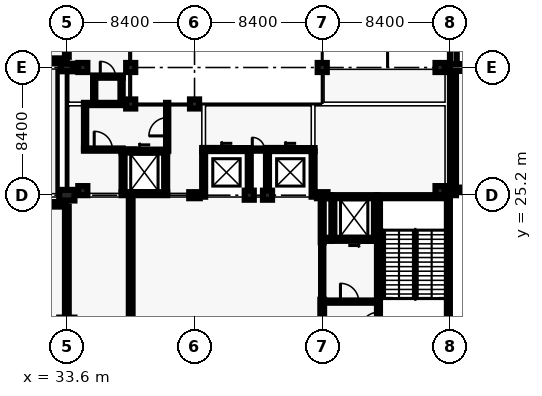
"""IFC4 building model, lengths in metres.
Left out: names, types, materials, properties, quantities, classifications, styles, units other than length and angle.
Written with IfcOpenShell. Run it as: python <this file> out.ifc"""

import sys

from ifc_helpers import new_model, si_unit, direction, frame, frame_2d, origin, origin_2d, place, context, subcontext, project, spatial, rectangle, extrude, element, fill, save


model = new_model("IFC4")
c1 = context("Model", 3, precision=1e-05, world=origin(), true_north=direction((0.0, 1.0)))
c2 = subcontext(c1, "Body", "Model", "MODEL_VIEW")
j1 = project(units=[si_unit("LENGTHUNIT", "METRE"), si_unit("PLANEANGLEUNIT", "RADIAN")], contexts=[c1])
p1 = place(None, origin())
s1 = spatial("IfcSite", under=j1, at=p1, CompositionType="ELEMENT")
p2 = place(p1, origin())
s2 = spatial("IfcBuilding", under=s1, at=p2, CompositionType="ELEMENT")
p3 = place(p2, frame((0.0, 0.0, 10.2)))
s3 = spatial("IfcBuildingStorey", under=s2, at=p3, CompositionType="ELEMENT", Elevation=10.2)
p4 = place(p3, frame((54.0, 25.1, 0.0), z_axis=(0.0, 0.0, 1.0), x_axis=(1.0, 0.0, 0.0)))
e1 = element("IfcWall", 1, at=p4, inside=s3, PredefinedType="SHEAR", context=c2, shape_type="SweptSolid", body=[
    extrude(rectangle(XDim=4.8, YDim=0.2, at=frame_2d((2.4, 0.0))), origin(), (0.0, 0.0, 1.0), 4.8),
])
p5 = place(p3, frame((54.1, 15.8, 0.0), z_axis=(0.0, 0.0, 1.0), x_axis=(0.0, 1.0, 0.0)))
e2 = element("IfcWall", 2, at=p5, inside=s3, PredefinedType="SHEAR", context=c2, shape_type="SweptSolid", body=[
    extrude(rectangle(XDim=9.2, YDim=0.2, at=frame_2d((4.6, 0.0))), origin(), (0.0, 0.0, 1.0), 4.8),
])
p6 = place(p5, frame((0.5, 0.0, 0.0)))
e3 = element("IfcOpeningElement", 3, at=p6, cuts=e2, PredefinedType="OPENING", context=c2, shape_type="SweptSolid", body=[
    extrude(rectangle(XDim=1.2, YDim=2.1, at=frame_2d((0.6, 1.05))), frame((0.0, 0.11, 0.0), z_axis=(0.0, -1.0, 0.0), x_axis=(1.0, 0.0, 0.0)), (0.0, 0.0, 1.0), 0.22),
])
p7 = place(p3, frame((58.7, 25.0, 0.0), z_axis=(0.0, 0.0, 1.0), x_axis=(0.0, -1.0, 0.0)))
e4 = element("IfcWall", 4, at=p7, inside=s3, PredefinedType="SHEAR", context=c2, shape_type="SweptSolid", body=[
    extrude(rectangle(XDim=9.2, YDim=0.2, at=frame_2d((4.6, 0.0))), origin(), (0.0, 0.0, 1.0), 4.8),
])
p8 = place(p3, frame((54.0, 22.3, 0.0), z_axis=(0.0, 0.0, 1.0), x_axis=(-1.0, 0.0, 0.0)))
e5 = element("IfcWall", 5, at=p8, inside=s3, PredefinedType="SHEAR", context=c2, shape_type="SweptSolid", body=[
    extrude(rectangle(XDim=3.0, YDim=0.2, at=frame_2d((1.5, 0.0))), origin(), (0.0, 0.0, 1.0), 4.8),
])
p9 = place(p8, frame((0.95, 0.0, 0.0)))
e6 = element("IfcOpeningElement", 6, at=p9, cuts=e5, PredefinedType="OPENING", context=c2, shape_type="SweptSolid", body=[
    extrude(rectangle(XDim=1.1, YDim=2.1, at=frame_2d((0.55, 1.05))), frame((0.0, 0.11, 0.0), z_axis=(0.0, -1.0, 0.0), x_axis=(1.0, 0.0, 0.0)), (0.0, 0.0, 1.0), 0.22),
])
p10 = place(p3, frame((51.0, 25.1, 0.0), z_axis=(0.0, 0.0, 1.0), x_axis=(1.0, 0.0, 0.0)))
e7 = element("IfcWall", 7, at=p10, inside=s3, PredefinedType="SHEAR", context=c2, shape_type="SweptSolid", body=[
    extrude(rectangle(XDim=3.0, YDim=0.2, at=frame_2d((1.5, 0.0))), origin(), (0.0, 0.0, 1.0), 4.8),
])
for number, where, z_axis, x_axis in (
    (8, (51.1, 22.4, 0.0), (0.0, 0.0, 1.0), (0.0, 1.0, 0.0)),
    (9, (53.9, 25.0, 0.0), (0.0, 0.0, 1.0), (0.0, -1.0, 0.0)),
):
    element("IfcWall", number, at=place(p3, frame(where, z_axis=z_axis, x_axis=x_axis)), inside=s3, PredefinedType="SHEAR", context=c2, shape_type="SweptSolid", body=[
        extrude(rectangle(XDim=2.6, YDim=0.2, at=frame_2d((1.3, 0.0))), origin(), (0.0, 0.0, 1.0), 4.8),
    ])
p11 = place(p3, frame((40.2, 25.3, 0.0), z_axis=(0.0, 0.0, 1.0), x_axis=(-1.0, 0.0, 0.0)))
e10 = element("IfcWall", 10, at=p11, inside=s3, PredefinedType="SHEAR", context=c2, shape_type="SweptSolid", body=[
    extrude(rectangle(XDim=3.0, YDim=0.2, at=frame_2d((1.5, 0.0))), origin(), (0.0, 0.0, 1.0), 4.8),
])
p12 = place(p3, frame((37.2, 28.1, 0.0), z_axis=(0.0, 0.0, 1.0), x_axis=(1.0, 0.0, 0.0)))
e11 = element("IfcWall", 11, at=p12, inside=s3, PredefinedType="SHEAR", context=c2, shape_type="SweptSolid", body=[
    extrude(rectangle(XDim=3.0, YDim=0.2, at=frame_2d((1.5, 0.0))), origin(), (0.0, 0.0, 1.0), 4.8),
])
p13 = place(p12, frame((0.95, 0.0, 0.0)))
e12 = element("IfcOpeningElement", 12, at=p13, cuts=e11, PredefinedType="OPENING", context=c2, shape_type="SweptSolid", body=[
    extrude(rectangle(XDim=1.1, YDim=2.1, at=frame_2d((0.55, 1.05))), frame((0.0, 0.11, 0.0), z_axis=(0.0, -1.0, 0.0), x_axis=(1.0, 0.0, 0.0)), (0.0, 0.0, 1.0), 0.22),
])
for number, where, z_axis, x_axis in (
    (13, (37.3, 25.4, 0.0), (0.0, 0.0, 1.0), (0.0, 1.0, 0.0)),
    (14, (40.1, 28.0, 0.0), (0.0, 0.0, 1.0), (0.0, -1.0, 0.0)),
):
    element("IfcWall", number, at=place(p3, frame(where, z_axis=z_axis, x_axis=x_axis)), inside=s3, PredefinedType="SHEAR", context=c2, shape_type="SweptSolid", body=[
        extrude(rectangle(XDim=2.6, YDim=0.2, at=frame_2d((1.3, 0.0))), origin(), (0.0, 0.0, 1.0), 4.8),
    ])
p14 = place(p3, frame((62.4, 33.6, 0.0), z_axis=(0.0, 0.0, 1.0), x_axis=(-1.0, 0.0, 0.0)))
e15 = element("IfcWall", 15, at=p14, inside=s3, PredefinedType="SHEAR", context=c2, shape_type="SweptSolid", body=[
    extrude(rectangle(XDim=3.6, YDim=0.45, at=frame_2d((1.8, 0.0))), origin(), (0.0, 0.0, 1.0), 4.8),
])
p15 = place(p3, frame((59.025, 33.825, 0.0), z_axis=(0.0, 0.0, 1.0), x_axis=(0.0, 1.0, 0.0)))
e16 = element("IfcWall", 16, at=p15, inside=s3, PredefinedType="SHEAR", context=c2, shape_type="SweptSolid", body=[
    extrude(rectangle(XDim=23.775, YDim=0.45, at=frame_2d((11.888, 0.0))), origin(), (0.0, 0.0, 1.0), 4.8),
])
p16 = place(p3, frame((59.0, 25.2, 0.0), z_axis=(0.0, 0.0, 1.0), x_axis=(0.0, 1.0, 0.0)))
e17 = element("IfcWall", 17, at=p16, inside=s3, PredefinedType="SHEAR", context=c2, shape_type="SweptSolid", body=[
    extrude(rectangle(XDim=8.175, YDim=0.4, at=frame_2d((4.087, 0.0))), origin(), (0.0, 0.0, 1.0), 4.8),
])
for number, where, z_axis, x_axis in (
    (18, (33.6, 16.8, 0.0), (0.0, 0.0, 1.0), (0.0, 1.0, 0.0)),
    (19, (33.6, 25.2, 0.0), (0.0, 0.0, 1.0), (1.0, 0.0, 0.0)),
):
    element("IfcColumn", number, at=place(p3, frame(where, z_axis=z_axis, x_axis=x_axis)), inside=s3, PredefinedType="COLUMN", context=c2, shape_type="SweptSolid", body=[
        extrude(rectangle(XDim=1.0, YDim=0.7, at=origin_2d()), origin(), (0.0, 0.0, 1.0), 4.8),
    ])
for number, where, z_axis, x_axis in (
    (20, (42.0, 25.2, 0.0), (0.0, 0.0, 1.0), (1.0, 0.0, 0.0)),
    (21, (50.4, 25.2, 0.0), (0.0, 0.0, 1.0), (1.0, 0.0, 0.0)),
):
    element("IfcColumn", number, at=place(p3, frame(where, z_axis=z_axis, x_axis=x_axis)), inside=s3, PredefinedType="COLUMN", context=c2, shape_type="SweptSolid", body=[
        extrude(rectangle(XDim=0.7, YDim=0.4, at=origin_2d()), origin(), (0.0, 0.0, 1.0), 4.8),
    ])
p17 = place(p3, frame((33.6, 33.6, 0.0), z_axis=(0.0, 0.0, 1.0), x_axis=(1.0, 0.0, 0.0)))
e22 = element("IfcColumn", 22, at=p17, inside=s3, PredefinedType="COLUMN", context=c2, shape_type="SweptSolid", body=[
    extrude(rectangle(XDim=0.8, YDim=0.5, at=origin_2d()), origin(), (0.0, 0.0, 1.0), 4.8),
])
for number, where, z_axis, x_axis in (
    (23, (50.4, 33.6, 0.0), (0.0, 0.0, 1.0), (1.0, 0.0, 0.0)),
    (24, (34.65, 25.5, 0.0), (0.0, 0.0, 1.0), (1.0, 0.0, 0.0)),
    (25, (34.65, 33.6, 0.0), (0.0, 0.0, 1.0), (1.0, 0.0, 0.0)),
    (26, (58.15, 25.5, 0.0), (0.0, 0.0, 1.0), (1.0, 0.0, 0.0)),
    (27, (58.15, 33.6, 0.0), (0.0, 0.0, 1.0), (1.0, 0.0, 0.0)),
):
    element("IfcColumn", number, at=place(p3, frame(where, z_axis=z_axis, x_axis=x_axis)), inside=s3, PredefinedType="COLUMN", context=c2, shape_type="SweptSolid", body=[
        extrude(rectangle(XDim=0.6, YDim=0.6, at=origin_2d()), origin(), (0.0, 0.0, 1.0), 4.8),
    ])
p18 = place(p3, frame((51.0, 22.3, 0.0), z_axis=(0.0, 0.0, 1.0), x_axis=(-1.0, 0.0, 0.0)))
e28 = element("IfcWall", 28, at=p18, inside=s3, PredefinedType="SHEAR", context=c2, shape_type="SweptSolid", body=[
    extrude(rectangle(XDim=0.5, YDim=0.2, at=frame_2d((0.25, 0.0))), origin(), (0.0, 0.0, 1.0), 4.8),
])
p19 = place(p3, frame((50.75, 25.1, 0.0), z_axis=(0.0, 0.0, 1.0), x_axis=(1.0, 0.0, 0.0)))
e29 = element("IfcWall", 29, at=p19, inside=s3, PredefinedType="SHEAR", context=c2, shape_type="SweptSolid", body=[
    extrude(rectangle(XDim=0.25, YDim=0.2, at=frame_2d((0.125, 0.0))), origin(), (0.0, 0.0, 1.0), 4.8),
])
p20 = place(p3, frame((58.625, 33.375, 0.0), z_axis=(0.0, 0.0, 1.0), x_axis=(0.0, 1.0, 0.0)))
e30 = element("IfcWall", 30, at=p20, inside=s3, PredefinedType="SHEAR", context=c2, shape_type="SweptSolid", body=[
    extrude(rectangle(XDim=0.45, YDim=0.35, at=frame_2d((0.225, 0.0))), origin(), (0.0, 0.0, 1.0), 4.8),
])
for number, where, z_axis, x_axis in (
    (31, (45.599, 25.2, 0.0), (0.0, 0.0, 1.0), (1.0, 0.0, 0.0)),
    (32, (46.801, 25.2, 0.0), (0.0, 0.0, 1.0), (1.0, 0.0, 0.0)),
    (33, (37.8, 31.2, 0.0), (0.0, 0.0, 1.0), (1.0, 0.0, 0.0)),
    (34, (37.801, 33.6, 0.0), (0.0, 0.0, 1.0), (1.0, 0.0, 0.0)),
    (35, (42.0, 31.201, 0.0), (0.0, 0.0, 1.0), (1.0, 0.0, 0.0)),
):
    element("IfcColumn", number, at=place(p3, frame(where, z_axis=z_axis, x_axis=x_axis)), inside=s3, PredefinedType="COLUMN", context=c2, shape_type="SweptSolid", body=[
        extrude(rectangle(XDim=0.6, YDim=0.6, at=origin_2d()), origin(), (0.0, 0.0, 1.0), 4.8),
    ])
p21 = place(p3, frame((26.95, 24.6, 0.0), z_axis=(0.0, 0.0, 1.0), x_axis=(1.0, 0.0, 0.0)))
e36 = element("IfcWall", 36, at=p21, inside=s3, PredefinedType="SOLIDWALL", context=c2, shape_type="SweptSolid", body=[
    extrude(rectangle(XDim=6.525, YDim=0.3, at=frame_2d((3.262, 0.0))), origin(), (0.0, 0.0, 1.0), 4.5),
])
p22 = place(p21, frame((1.825, 0.0, 0.9)))
e37 = element("IfcOpeningElement", 37, at=p22, cuts=e36, PredefinedType="OPENING", context=c2, shape_type="SweptSolid", body=[
    extrude(rectangle(XDim=2.4, YDim=1.5, at=frame_2d((1.2, 0.75))), frame((0.0, 0.16, 0.0), z_axis=(0.0, -1.0, 0.0), x_axis=(1.0, 0.0, 0.0)), (0.0, 0.0, 1.0), 0.32),
])
p23 = place(p3, frame((62.4, 25.55, 0.0), z_axis=(0.0, 0.0, 1.0), x_axis=(-1.0, 0.0, 0.0)))
e38 = element("IfcWall", 38, at=p23, inside=s3, PredefinedType="SOLIDWALL", context=c2, shape_type="SweptSolid", body=[
    extrude(rectangle(XDim=3.2, YDim=0.3, at=frame_2d((1.6, 0.0))), origin(), (0.0, 0.0, 1.0), 4.8),
])
p24 = place(p23, frame((0.3, 0.0, 0.9)))
e39 = element("IfcOpeningElement", 39, at=p24, cuts=e38, PredefinedType="OPENING", context=c2, shape_type="SweptSolid", body=[
    extrude(rectangle(XDim=2.4, YDim=1.8, at=frame_2d((1.2, 0.9))), frame((0.0, 0.16, 0.0), z_axis=(0.0, -1.0, 0.0), x_axis=(1.0, 0.0, 0.0)), (0.0, 0.0, 1.0), 0.32),
])
p25 = place(p3, frame((33.6, 34.05, 0.0), z_axis=(0.0, 0.0, 1.0), x_axis=(-1.0, 0.0, 0.0)))
e40 = element("IfcWall", 40, at=p25, inside=s3, PredefinedType="SOLIDWALL", context=c2, shape_type="SweptSolid", body=[
    extrude(rectangle(XDim=4.2, YDim=0.3, at=frame_2d((2.1, 0.0))), origin(), (0.0, 0.0, 1.0), 4.5),
])
p26 = place(p3, frame((33.6, 8.6, 0.0), z_axis=(0.0, 0.0, 1.0), x_axis=(0.0, 1.0, 0.0)))
e41 = element("IfcWall", 41, at=p26, inside=s3, PredefinedType="SOLIDWALL", context=c2, shape_type="SweptSolid", body=[
    extrude(rectangle(XDim=15.85, YDim=0.25, at=frame_2d((7.925, 0.0))), origin(), (0.0, 0.0, 1.0), 3.8),
])
p27 = place(p3, frame((33.6, 34.3, 0.0), z_axis=(0.0, 0.0, 1.0), x_axis=(0.0, 1.0, 0.0)))
e42 = element("IfcWall", 42, at=p27, inside=s3, PredefinedType="SOLIDWALL", context=c2, shape_type="SweptSolid", body=[
    extrude(rectangle(XDim=7.825, YDim=0.25, at=frame_2d((3.913, 0.0))), origin(), (0.0, 0.0, 1.0), 3.8),
])
p28 = place(p27, frame((2.9, 0.0, 0.0)))
e43 = element("IfcOpeningElement", 43, at=p28, cuts=e42, PredefinedType="OPENING", context=c2, shape_type="SweptSolid", body=[
    extrude(rectangle(XDim=1.2, YDim=2.1, at=frame_2d((0.6, 1.05))), frame((0.0, 0.135, 0.0), z_axis=(0.0, -1.0, 0.0), x_axis=(1.0, 0.0, 0.0)), (0.0, 0.0, 1.0), 0.27),
])
p29 = place(p3, frame((37.8, 8.525, 0.0), z_axis=(0.0, 0.0, 1.0), x_axis=(0.0, 1.0, 0.0)))
e44 = element("IfcWall", 44, at=p29, inside=s3, PredefinedType="PARTITIONING", context=c2, shape_type="SweptSolid", body=[
    extrude(rectangle(XDim=16.675, YDim=0.25, at=frame_2d((8.337, 0.0))), origin(), (0.0, 0.0, 1.0), 3.8),
])
p30 = place(p3, frame((50.4, 8.525, 0.0), z_axis=(0.0, 0.0, 1.0), x_axis=(0.0, 1.0, 0.0)))
e45 = element("IfcWall", 45, at=p30, inside=s3, PredefinedType="PARTITIONING", context=c2, shape_type="SweptSolid", body=[
    extrude(rectangle(XDim=9.8, YDim=0.25, at=frame_2d((4.9, 0.0))), origin(), (0.0, 0.0, 1.0), 3.8),
])
p31 = place(p3, frame((42.5, 28.2, 0.0), z_axis=(0.0, 0.0, 1.0), x_axis=(1.0, 0.0, 0.0)))
e46 = element("IfcWall", 46, at=p31, inside=s3, PredefinedType="SHEAR", context=c2, shape_type="SweptSolid", body=[
    extrude(rectangle(XDim=3.2, YDim=0.2, at=frame_2d((1.6, 0.0))), origin(), (0.0, 0.0, 1.0), 4.5),
])
p32 = place(p31, frame((1.05, 0.0, 0.0)))
e47 = element("IfcOpeningElement", 47, at=p32, cuts=e46, PredefinedType="OPENING", context=c2, shape_type="SweptSolid", body=[
    extrude(rectangle(XDim=1.1, YDim=2.1, at=frame_2d((0.55, 1.05))), frame((0.0, 0.11, 0.0), z_axis=(0.0, -1.0, 0.0), x_axis=(1.0, 0.0, 0.0)), (0.0, 0.0, 1.0), 0.22),
])
p33 = place(p3, frame((46.7, 28.2, 0.0), z_axis=(0.0, 0.0, 1.0), x_axis=(1.0, 0.0, 0.0)))
e48 = element("IfcWall", 48, at=p33, inside=s3, PredefinedType="SHEAR", context=c2, shape_type="SweptSolid", body=[
    extrude(rectangle(XDim=3.2, YDim=0.2, at=frame_2d((1.6, 0.0))), origin(), (0.0, 0.0, 1.0), 4.5),
])
p34 = place(p33, frame((1.05, 0.0, 0.0)))
e49 = element("IfcOpeningElement", 49, at=p34, cuts=e48, PredefinedType="OPENING", context=c2, shape_type="SweptSolid", body=[
    extrude(rectangle(XDim=1.1, YDim=2.1, at=frame_2d((0.55, 1.05))), frame((0.0, 0.11, 0.0), z_axis=(0.0, -1.0, 0.0), x_axis=(1.0, 0.0, 0.0)), (0.0, 0.0, 1.0), 0.22),
])
for number, where, z_axis, x_axis in (
    (50, (42.6, 25.1, 0.0), (0.0, 0.0, 1.0), (0.0, 1.0, 0.0)),
    (51, (45.6, 25.1, 0.0), (0.0, 0.0, 1.0), (0.0, 1.0, 0.0)),
    (52, (46.8, 25.1, 0.0), (0.0, 0.0, 1.0), (0.0, 1.0, 0.0)),
    (53, (49.8, 25.1, 0.0), (0.0, 0.0, 1.0), (0.0, 1.0, 0.0)),
):
    element("IfcWall", number, at=place(p3, frame(where, z_axis=z_axis, x_axis=x_axis)), inside=s3, PredefinedType="SHEAR", context=c2, shape_type="SweptSolid", body=[
        extrude(rectangle(XDim=3.0, YDim=0.2, at=frame_2d((1.5, 0.0))), origin(), (0.0, 0.0, 1.0), 4.5),
    ])
p35 = place(p3, frame((50.4, 22.1, 0.0), z_axis=(0.0, 0.0, 1.0), x_axis=(0.0, 1.0, 0.0)))
e54 = element("IfcWall", 54, at=p35, inside=s3, PredefinedType="SHEAR", context=c2, shape_type="SweptSolid", body=[
    extrude(rectangle(XDim=3.2, YDim=0.2, at=frame_2d((1.6, 0.0))), origin(), (0.0, 0.0, 1.0), 4.5),
])
p36 = place(p3, frame((35.325, 33.0, 0.0), z_axis=(0.0, 0.0, 1.0), x_axis=(1.0, 0.0, 0.0)))
e55 = element("IfcWall", 55, at=p36, inside=s3, PredefinedType="PARTITIONING", context=c2, shape_type="SweptSolid", body=[
    extrude(rectangle(XDim=1.95, YDim=0.15, at=frame_2d((0.975, 0.0))), origin(), (0.0, 0.0, 1.0), 4.5),
])
p37 = place(p36, frame((0.475, 0.0, 0.0)))
e56 = element("IfcOpeningElement", 56, at=p37, cuts=e55, PredefinedType="OPENING", context=c2, shape_type="SweptSolid", body=[
    extrude(rectangle(XDim=1.0, YDim=2.1, at=frame_2d((0.5, 1.05))), frame((0.0, 0.085, 0.0), z_axis=(0.0, -1.0, 0.0), x_axis=(1.0, 0.0, 0.0)), (0.0, 0.0, 1.0), 0.17),
])
p38 = place(p3, frame((50.525, 18.2, 0.0), z_axis=(0.0, 0.0, 1.0), x_axis=(1.0, 0.0, 0.0)))
e57 = element("IfcWall", 57, at=p38, inside=s3, PredefinedType="SOLIDWALL", context=c2, shape_type="SweptSolid", body=[
    extrude(rectangle(XDim=3.475, YDim=0.15, at=frame_2d((1.738, 0.0))), origin(), (0.0, 0.0, 1.0), 3.8),
])
p39 = place(p38, frame((1.075, 0.0, 0.0)))
e58 = element("IfcOpeningElement", 58, at=p39, cuts=e57, PredefinedType="OPENING", context=c2, shape_type="SweptSolid", body=[
    extrude(rectangle(XDim=1.2, YDim=2.1, at=frame_2d((0.6, 1.05))), frame((0.0, 0.085, 0.0), z_axis=(0.0, -1.0, 0.0), x_axis=(1.0, 0.0, 0.0)), (0.0, 0.0, 1.0), 0.17),
])
p40 = place(p3, frame((34.725, 28.2, 0.0), z_axis=(0.0, 0.0, 1.0), x_axis=(1.0, 0.0, 0.0)))
e59 = element("IfcWall", 59, at=p40, inside=s3, PredefinedType="SOLIDWALL", context=c2, shape_type="SweptSolid", body=[
    extrude(rectangle(XDim=2.55, YDim=0.15, at=frame_2d((1.275, 0.0))), origin(), (0.0, 0.0, 1.0), 4.5),
])
p41 = place(p40, frame((0.675, 0.0, 0.0)))
e60 = element("IfcOpeningElement", 60, at=p41, cuts=e59, PredefinedType="OPENING", context=c2, shape_type="SweptSolid", body=[
    extrude(rectangle(XDim=1.2, YDim=2.1, at=frame_2d((0.6, 1.05))), frame((0.0, 0.085, 0.0), z_axis=(0.0, -1.0, 0.0), x_axis=(1.0, 0.0, 0.0)), (0.0, 0.0, 1.0), 0.17),
])
p42 = place(p3, frame((34.725, 31.2, 0.0), z_axis=(0.0, 0.0, 1.0), x_axis=(1.0, 0.0, 0.0)))
e61 = element("IfcWall", 61, at=p42, inside=s3, PredefinedType="SOLIDWALL", context=c2, shape_type="SweptSolid", body=[
    extrude(rectangle(XDim=3.15, YDim=0.15, at=frame_2d((1.575, 0.0))), origin(), (0.0, 0.0, 1.0), 4.0),
])
p43 = place(p3, frame((45.7, 28.2, 0.0), z_axis=(0.0, 0.0, 1.0), x_axis=(1.0, 0.0, 0.0)))
e62 = element("IfcWall", 62, at=p43, inside=s3, PredefinedType="SOLIDWALL", context=c2, shape_type="SweptSolid", body=[
    extrude(rectangle(XDim=1.0, YDim=0.15, at=frame_2d((0.5, 0.0))), origin(), (0.0, 0.0, 1.0), 4.5),
])
p44 = place(p43, frame((0.1, 0.0, 0.0)))
e63 = element("IfcOpeningElement", 63, at=p44, cuts=e62, PredefinedType="OPENING", context=c2, shape_type="SweptSolid", body=[
    extrude(rectangle(XDim=0.8, YDim=2.1, at=frame_2d((0.4, 1.05))), frame((0.0, 0.085, 0.0), z_axis=(0.0, -1.0, 0.0), x_axis=(1.0, 0.0, 0.0)), (0.0, 0.0, 1.0), 0.17),
])
for number, where, z_axis, x_axis in (
    (64, (35.4, 31.275, 0.0), (0.0, 0.0, 1.0), (0.0, 1.0, 0.0)),
    (65, (37.2, 31.275, 0.0), (0.0, 0.0, 1.0), (0.0, 1.0, 0.0)),
):
    element("IfcWall", number, at=place(p3, frame(where, z_axis=z_axis, x_axis=x_axis)), inside=s3, PredefinedType="PARTITIONING", context=c2, shape_type="SweptSolid", body=[
        extrude(rectangle(XDim=1.65, YDim=0.15, at=frame_2d((0.825, 0.0))), origin(), (0.0, 0.0, 1.0), 4.5),
    ])
p45 = place(p3, frame((34.8, 28.275, 0.0), z_axis=(0.0, 0.0, 1.0), x_axis=(0.0, 1.0, 0.0)))
e66 = element("IfcWall", 66, at=p45, inside=s3, PredefinedType="SOLIDWALL", context=c2, shape_type="SweptSolid", body=[
    extrude(rectangle(XDim=2.85, YDim=0.15, at=frame_2d((1.425, 0.0))), origin(), (0.0, 0.0, 1.0), 4.5),
])
p46 = place(p3, frame((40.2, 28.125, 0.0), z_axis=(0.0, 0.0, 1.0), x_axis=(0.0, 1.0, 0.0)))
e67 = element("IfcWall", 67, at=p46, inside=s3, PredefinedType="SOLIDWALL", context=c2, shape_type="SweptSolid", body=[
    extrude(rectangle(XDim=3.15, YDim=0.15, at=frame_2d((1.575, 0.0))), origin(), (0.0, 0.0, 1.0), 4.0),
])
p47 = place(p46, frame((0.975, 0.0, 0.0)))
e68 = element("IfcOpeningElement", 68, at=p47, cuts=e67, PredefinedType="OPENING", context=c2, shape_type="SweptSolid", body=[
    extrude(rectangle(XDim=1.2, YDim=2.1, at=frame_2d((0.6, 1.05))), frame((0.0, 0.085, 0.0), z_axis=(0.0, -1.0, 0.0), x_axis=(1.0, 0.0, 0.0)), (0.0, 0.0, 1.0), 0.17),
])
p48 = place(p3, frame((50.4, 18.325, 0.0), z_axis=(0.0, 0.0, 1.0), x_axis=(0.0, 1.0, 0.0)))
e69 = element("IfcWall", 69, at=p48, inside=s3, PredefinedType="SOLIDWALL", context=c2, shape_type="SweptSolid", body=[
    extrude(rectangle(XDim=3.775, YDim=0.15, at=frame_2d((1.888, 0.0))), origin(), (0.0, 0.0, 1.0), 3.8),
])
p49 = place(p9, origin())
e70 = element("IfcDoor", 70, at=p49, inside=s3, OperationType="SLIDING_TO_LEFT", PredefinedType="DOOR", context=c2, shape_type="SweptSolid", body=[
    extrude(rectangle(XDim=1.1, YDim=2.1, at=frame_2d((0.55, 1.05))), frame((0.0, 0.025, 0.0), z_axis=(0.0, -1.0, 0.0), x_axis=(1.0, 0.0, 0.0)), (0.0, 0.0, 1.0), 0.05),
])
fill(e6, e70)
p50 = place(p32, origin())
e71 = element("IfcDoor", 71, at=p50, inside=s3, OperationType="SLIDING_TO_LEFT", PredefinedType="DOOR", context=c2, shape_type="SweptSolid", body=[
    extrude(rectangle(XDim=1.1, YDim=2.1, at=frame_2d((0.55, 1.05))), frame((0.0, 0.025, 0.0), z_axis=(0.0, -1.0, 0.0), x_axis=(1.0, 0.0, 0.0)), (0.0, 0.0, 1.0), 0.05),
])
fill(e47, e71)
p51 = place(p34, origin())
e72 = element("IfcDoor", 72, at=p51, inside=s3, OperationType="SLIDING_TO_LEFT", PredefinedType="DOOR", context=c2, shape_type="SweptSolid", body=[
    extrude(rectangle(XDim=1.1, YDim=2.1, at=frame_2d((0.55, 1.05))), frame((0.0, 0.025, 0.0), z_axis=(0.0, -1.0, 0.0), x_axis=(1.0, 0.0, 0.0)), (0.0, 0.0, 1.0), 0.05),
])
fill(e49, e72)
p52 = place(p13, origin())
e73 = element("IfcDoor", 73, at=p52, inside=s3, OperationType="SLIDING_TO_LEFT", PredefinedType="DOOR", context=c2, shape_type="SweptSolid", body=[
    extrude(rectangle(XDim=1.1, YDim=2.1, at=frame_2d((0.55, 1.05))), frame((0.0, 0.025, 0.0), z_axis=(0.0, -1.0, 0.0), x_axis=(1.0, 0.0, 0.0)), (0.0, 0.0, 1.0), 0.05),
])
fill(e12, e73)
p53 = place(p6, origin())
e74 = element("IfcDoor", 74, at=p53, inside=s3, OperationType="SINGLE_SWING_LEFT", PredefinedType="DOOR", context=c2, shape_type="SweptSolid", body=[
    extrude(rectangle(XDim=1.2, YDim=2.1, at=frame_2d((0.6, 1.05))), frame((0.0, 0.025, 0.0), z_axis=(0.0, -1.0, 0.0), x_axis=(1.0, 0.0, 0.0)), (0.0, 0.0, 1.0), 0.05),
])
fill(e3, e74)
p54 = place(p37, origin())
e75 = element("IfcDoor", 75, at=p54, inside=s3, OperationType="SINGLE_SWING_LEFT", PredefinedType="DOOR", context=c2, shape_type="SweptSolid", body=[
    extrude(rectangle(XDim=1.0, YDim=2.1, at=frame_2d((0.5, 1.05))), frame((0.0, 0.025, 0.0), z_axis=(0.0, -1.0, 0.0), x_axis=(1.0, 0.0, 0.0)), (0.0, 0.0, 1.0), 0.05),
])
fill(e56, e75)
p55 = place(p39, origin())
e76 = element("IfcDoor", 76, at=p55, inside=s3, OperationType="SINGLE_SWING_RIGHT", PredefinedType="DOOR", context=c2, shape_type="SweptSolid", body=[
    extrude(rectangle(XDim=1.2, YDim=2.1, at=frame_2d((0.6, 1.05))), frame((0.0, 0.025, 0.0), z_axis=(0.0, -1.0, 0.0), x_axis=(1.0, 0.0, 0.0)), (0.0, 0.0, 1.0), 0.05),
])
fill(e58, e76)
p56 = place(p41, origin())
e77 = element("IfcDoor", 77, at=p56, inside=s3, OperationType="SINGLE_SWING_RIGHT", PredefinedType="DOOR", context=c2, shape_type="SweptSolid", body=[
    extrude(rectangle(XDim=1.2, YDim=2.1, at=frame_2d((0.6, 1.05))), frame((0.0, 0.025, 0.0), z_axis=(0.0, -1.0, 0.0), x_axis=(1.0, 0.0, 0.0)), (0.0, 0.0, 1.0), 0.05),
])
fill(e60, e77)
p57 = place(p47, origin())
e78 = element("IfcDoor", 78, at=p57, inside=s3, OperationType="SINGLE_SWING_RIGHT", PredefinedType="DOOR", context=c2, shape_type="SweptSolid", body=[
    extrude(rectangle(XDim=1.2, YDim=2.1, at=frame_2d((0.6, 1.05))), frame((0.0, 0.025, 0.0), z_axis=(0.0, -1.0, 0.0), x_axis=(1.0, 0.0, 0.0)), (0.0, 0.0, 1.0), 0.05),
])
fill(e68, e78)
p58 = place(p44, origin())
e79 = element("IfcDoor", 79, at=p58, inside=s3, OperationType="SINGLE_SWING_RIGHT", PredefinedType="DOOR", context=c2, shape_type="SweptSolid", body=[
    extrude(rectangle(XDim=0.8, YDim=2.1, at=frame_2d((0.4, 1.05))), frame((0.0, 0.025, 0.0), z_axis=(0.0, -1.0, 0.0), x_axis=(1.0, 0.0, 0.0)), (0.0, 0.0, 1.0), 0.05),
])
fill(e63, e79)
save(model, sys.argv[1])
